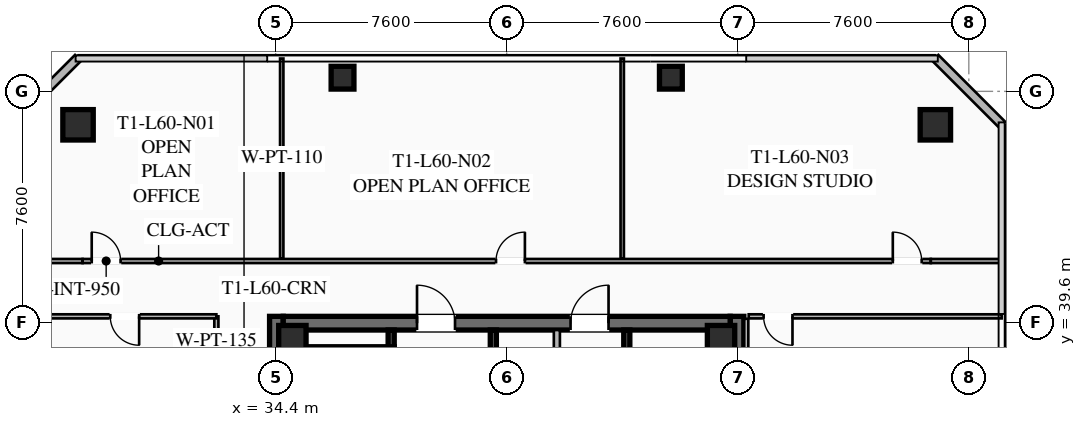
"""IFC4 building model, lengths in metres.
Left out: names, types, materials, properties, quantities, classifications, styles, units other than length and angle.
Written with IfcOpenShell. Run it as: python <this file> out.ifc"""

import sys

from ifc_helpers import new_model, si_unit, direction, frame, frame_2d, origin, origin_2d, place, context, subcontext, project, spatial, rectangle, hollow_rectangle, extrude, element, fill, save


model = new_model("IFC4")
c1 = context("Model", 3, precision=1e-05, world=origin(), true_north=direction((0.0, 1.0)))
c2 = subcontext(c1, "Body", "Model", "MODEL_VIEW")
j1 = project(units=[si_unit("LENGTHUNIT", "METRE"), si_unit("PLANEANGLEUNIT", "RADIAN")], contexts=[c1])
p1 = place(None, origin())
s1 = spatial("IfcSite", under=j1, at=p1, CompositionType="ELEMENT")
p2 = place(p1, origin())
s2 = spatial("IfcBuilding", under=s1, at=p2, CompositionType="ELEMENT")
p3 = place(p2, frame((0.0, 0.0, 221.95)))
s3 = spatial("IfcBuildingStorey", under=s2, at=p3, CompositionType="ELEMENT", Elevation=221.95)
for number, where, z_axis, x_axis in (
    (1, (34.425, 24.2, 0.0), (0.0, 0.0, 1.0), (0.0, 1.0, 0.0)),
    (2, (49.575, 39.8, 0.0), (0.0, 0.0, 1.0), (0.0, -1.0, 0.0)),
):
    element("IfcWall", number, at=place(p3, frame(where, z_axis=z_axis, x_axis=x_axis)), inside=s3, PredefinedType="SHEAR", context=c2, shape_type="SweptSolid", body=[
        extrude(rectangle(XDim=15.6, YDim=0.45, at=frame_2d((7.8, 0.0))), origin(), (0.0, 0.0, 1.0), 3.55),
    ])
p4 = place(p3, frame((34.65, 39.575, 0.0), z_axis=(0.0, 0.0, 1.0), x_axis=(1.0, 0.0, 0.0)))
e3 = element("IfcWall", 3, at=p4, inside=s3, PredefinedType="SHEAR", context=c2, shape_type="SweptSolid", body=[
    extrude(rectangle(XDim=14.7, YDim=0.45, at=frame_2d((7.35, 0.0))), origin(), (0.0, 0.0, 1.0), 3.55),
])
p5 = place(p4, frame((4.4, 0.0, 0.0)))
e4 = element("IfcOpeningElement", 4, at=p5, cuts=e3, PredefinedType="OPENING", context=c2, shape_type="SweptSolid", body=[
    extrude(rectangle(XDim=1.25, YDim=2.25, at=frame_2d((0.625, 1.125))), frame((0.0, 0.235, 0.0), z_axis=(0.0, -1.0, 0.0), x_axis=(1.0, 0.0, 0.0)), (0.0, 0.0, 1.0), 0.47),
])
p6 = place(p4, frame((9.45, 0.0, 0.0)))
e5 = element("IfcOpeningElement", 5, at=p6, cuts=e3, PredefinedType="OPENING", context=c2, shape_type="SweptSolid", body=[
    extrude(rectangle(XDim=1.25, YDim=2.25, at=frame_2d((0.625, 1.125))), frame((0.0, 0.235, 0.0), z_axis=(0.0, -1.0, 0.0), x_axis=(1.0, 0.0, 0.0)), (0.0, 0.0, 1.0), 0.47),
])
for number, where, z_axis, x_axis in (
    (6, (49.05, 39.05, 0.0), (0.0, 0.0, 1.0), (1.0, 0.0, 0.0)),
    (7, (34.95, 39.05, 0.0), (0.0, 0.0, 1.0), (1.0, 0.0, 0.0)),
):
    element("IfcColumn", number, at=place(p3, frame(where, z_axis=z_axis, x_axis=x_axis)), inside=s3, PredefinedType="COLUMN", context=c2, shape_type="SweptSolid", body=[
        extrude(hollow_rectangle(XDim=0.9, YDim=0.9, WallThickness=0.04, at=origin_2d()), origin(), (0.0, 0.0, 1.0), 3.37),
    ])
for number, where, z_axis, x_axis in (
    (8, (56.1, 46.1, 0.0), (0.0, 0.0, 1.0), (1.0, 0.0, 0.0)),
    (9, (27.9, 46.1, 0.0), (0.0, 0.0, 1.0), (1.0, 0.0, 0.0)),
):
    element("IfcColumn", number, at=place(p3, frame(where, z_axis=z_axis, x_axis=x_axis)), inside=s3, PredefinedType="COLUMN", context=c2, shape_type="SweptSolid", body=[
        extrude(hollow_rectangle(XDim=1.0, YDim=1.0, WallThickness=0.04, at=origin_2d()), origin(), (0.0, 0.0, 1.0), 3.37),
    ])
for number, where, z_axis, x_axis in (
    (10, (47.4, 47.65, 0.0), (0.0, 0.0, 1.0), (1.0, 0.0, 0.0)),
    (11, (36.6, 47.65, 0.0), (0.0, 0.0, 1.0), (1.0, 0.0, 0.0)),
):
    element("IfcColumn", number, at=place(p3, frame(where, z_axis=z_axis, x_axis=x_axis)), inside=s3, PredefinedType="COLUMN", context=c2, shape_type="SweptSolid", body=[
        extrude(hollow_rectangle(XDim=0.75, YDim=0.75, WallThickness=0.032, at=origin_2d()), origin(), (0.0, 0.0, 1.0), 3.37),
    ])
for number, where, z_axis, x_axis in (
    (12, (25.7, 46.1, 0.0), (0.0, 0.0, 1.0), (0.707, 0.707, 0.0)),
    (13, (56.1, 48.3, 0.0), (0.0, 0.0, 1.0), (0.707, -0.707, 0.0)),
):
    element("IfcWall", number, at=place(p3, frame(where, z_axis=z_axis, x_axis=x_axis)), inside=s3, PredefinedType="SOLIDWALL", context=c2, shape_type="SweptSolid", body=[
        extrude(rectangle(XDim=3.111, YDim=0.28, at=frame_2d((1.556, 0.0))), origin(), (0.0, 0.0, 1.0), 3.37),
    ])
p7 = place(p3, frame((38.2, 31.2, 0.0), z_axis=(0.0, 0.0, 1.0), x_axis=(0.0, 1.0, 0.0)))
e14 = element("IfcWall", 14, at=p7, inside=s3, PredefinedType="SHEAR", context=c2, shape_type="SweptSolid", body=[
    extrude(rectangle(XDim=8.15, YDim=0.2, at=frame_2d((4.075, 0.0))), origin(), (0.0, 0.0, 1.0), 3.37),
])
p8 = place(p7, frame((0.45, 0.0, 0.0)))
e15 = element("IfcOpeningElement", 15, at=p8, cuts=e14, PredefinedType="OPENING", context=c2, shape_type="SweptSolid", body=[
    extrude(rectangle(XDim=1.15, YDim=2.2, at=frame_2d((0.575, 1.1))), frame((0.0, 0.11, 0.0), z_axis=(0.0, -1.0, 0.0), x_axis=(1.0, 0.0, 0.0)), (0.0, 0.0, 1.0), 0.22),
])
p9 = place(p3, frame((41.56, 24.65, 0.0), z_axis=(0.0, 0.0, 1.0), x_axis=(0.0, 1.0, 0.0)))
e16 = element("IfcWall", 16, at=p9, inside=s3, PredefinedType="SHEAR", context=c2, shape_type="SweptSolid", body=[
    extrude(rectangle(XDim=14.7, YDim=0.2, at=frame_2d((7.35, 0.0))), origin(), (0.0, 0.0, 1.0), 3.37),
])
p10 = place(p3, frame((45.95, 39.35, 0.0), z_axis=(0.0, 0.0, 1.0), x_axis=(0.0, -1.0, 0.0)))
e17 = element("IfcWall", 17, at=p10, inside=s3, PredefinedType="SHEAR", context=c2, shape_type="SweptSolid", body=[
    extrude(rectangle(XDim=6.55, YDim=0.2, at=frame_2d((3.275, 0.0))), origin(), (0.0, 0.0, 1.0), 3.37),
])
p11 = place(p10, frame((5.075, 0.0, 0.0)))
e18 = element("IfcOpeningElement", 18, at=p11, cuts=e17, PredefinedType="OPENING", context=c2, shape_type="SweptSolid", body=[
    extrude(rectangle(XDim=1.1, YDim=2.2, at=frame_2d((0.55, 1.1))), frame((0.0, 0.11, 0.0), z_axis=(0.0, -1.0, 0.0), x_axis=(1.0, 0.0, 0.0)), (0.0, 0.0, 1.0), 0.22),
])
p12 = place(p10, frame((3.025, 0.0, 0.0)))
e19 = element("IfcOpeningElement", 19, at=p12, cuts=e17, PredefinedType="OPENING", context=c2, shape_type="SweptSolid", body=[
    extrude(rectangle(XDim=1.1, YDim=2.2, at=frame_2d((0.55, 1.1))), frame((0.0, 0.11, 0.0), z_axis=(0.0, -1.0, 0.0), x_axis=(1.0, 0.0, 0.0)), (0.0, 0.0, 1.0), 0.22),
])
p13 = place(p10, frame((1.025, 0.0, 0.0)))
e20 = element("IfcOpeningElement", 20, at=p13, cuts=e17, PredefinedType="OPENING", context=c2, shape_type="SweptSolid", body=[
    extrude(rectangle(XDim=1.1, YDim=2.2, at=frame_2d((0.55, 1.1))), frame((0.0, 0.11, 0.0), z_axis=(0.0, -1.0, 0.0), x_axis=(1.0, 0.0, 0.0)), (0.0, 0.0, 1.0), 0.22),
])
p14 = place(p3, frame((43.65, 32.35, 0.0), z_axis=(0.0, 0.0, 1.0), x_axis=(0.0, 1.0, 0.0)))
e21 = element("IfcWall", 21, at=p14, inside=s3, PredefinedType="SOLIDWALL", context=c2, shape_type="SweptSolid", body=[
    extrude(rectangle(XDim=7.0, YDim=0.2, at=frame_2d((3.5, 0.0))), origin(), (0.0, 0.0, 1.0), 2.723),
])
p15 = place(p14, frame((0.85, 0.0, 0.0)))
e22 = element("IfcOpeningElement", 22, at=p15, cuts=e21, PredefinedType="OPENING", context=c2, shape_type="SweptSolid", body=[
    extrude(rectangle(XDim=0.95, YDim=2.05, at=frame_2d((0.475, 1.025))), frame((0.0, 0.11, 0.0), z_axis=(0.0, -1.0, 0.0), x_axis=(1.0, 0.0, 0.0)), (0.0, 0.0, 1.0), 0.22),
])
p16 = place(p14, frame((4.85, 0.0, 0.0)))
e23 = element("IfcOpeningElement", 23, at=p16, cuts=e21, PredefinedType="OPENING", context=c2, shape_type="SweptSolid", body=[
    extrude(rectangle(XDim=0.95, YDim=2.05, at=frame_2d((0.475, 1.025))), frame((0.0, 0.11, 0.0), z_axis=(0.0, -1.0, 0.0), x_axis=(1.0, 0.0, 0.0)), (0.0, 0.0, 1.0), 0.22),
])
p17 = place(p3, frame((32.45, 35.4, 0.0), z_axis=(0.0, 0.0, 1.0), x_axis=(0.0, 1.0, 0.0)))
e24 = element("IfcWall", 24, at=p17, inside=s3, PredefinedType="PARTITIONING", context=c2, shape_type="SweptSolid", body=[
    extrude(rectangle(XDim=4.4, YDim=0.135, at=frame_2d((2.2, 0.0))), origin(), (0.0, 0.0, 1.0), 2.723),
])
p18 = place(p3, frame((28.05, 41.62, 0.0), z_axis=(0.0, 0.0, 1.0), x_axis=(1.0, 0.0, 0.0)))
e25 = element("IfcWall", 25, at=p18, inside=s3, PredefinedType="PARTITIONING", context=c2, shape_type="SweptSolid", body=[
    extrude(rectangle(XDim=27.9, YDim=0.135, at=frame_2d((13.95, 0.0))), origin(), (0.0, 0.0, 1.0), 2.723),
])
p19 = place(p18, frame((0.3, 0.0, 0.0)))
e26 = element("IfcOpeningElement", 26, at=p19, cuts=e25, PredefinedType="OPENING", context=c2, shape_type="SweptSolid", body=[
    extrude(rectangle(XDim=0.95, YDim=2.05, at=frame_2d((0.475, 1.025))), frame((0.0, 0.077, 0.0), z_axis=(0.0, -1.0, 0.0), x_axis=(1.0, 0.0, 0.0)), (0.0, 0.0, 1.0), 0.155),
])
p20 = place(p18, frame((13.599, 0.0, 0.0)))
e27 = element("IfcOpeningElement", 27, at=p20, cuts=e25, PredefinedType="OPENING", context=c2, shape_type="SweptSolid", body=[
    extrude(rectangle(XDim=0.95, YDim=2.05, at=frame_2d((0.475, 1.025))), frame((0.0, 0.077, 0.0), z_axis=(0.0, -1.0, 0.0), x_axis=(1.0, 0.0, 0.0)), (0.0, 0.0, 1.0), 0.155),
])
p21 = place(p18, frame((26.65, 0.0, 0.0)))
e28 = element("IfcOpeningElement", 28, at=p21, cuts=e25, PredefinedType="OPENING", context=c2, shape_type="SweptSolid", body=[
    extrude(rectangle(XDim=0.95, YDim=2.05, at=frame_2d((0.475, 1.025))), frame((0.0, 0.077, 0.0), z_axis=(0.0, -1.0, 0.0), x_axis=(1.0, 0.0, 0.0)), (0.0, 0.0, 1.0), 0.155),
])
for number, where, z_axis, x_axis in (
    (29, (25.72, 41.62, 0.0), (0.0, 0.0, 1.0), (1.0, 0.0, 0.0)),
    (30, (55.95, 41.62, 0.0), (0.0, 0.0, 1.0), (1.0, 0.0, 0.0)),
):
    element("IfcWall", number, at=place(p3, frame(where, z_axis=z_axis, x_axis=x_axis)), inside=s3, PredefinedType="PARTITIONING", context=c2, shape_type="SweptSolid", body=[
        extrude(rectangle(XDim=2.33, YDim=0.135, at=frame_2d((1.165, 0.0))), origin(), (0.0, 0.0, 1.0), 2.723),
    ])
for number, where, z_axis, x_axis in (
    (31, (34.6, 41.7, 0.0), (0.0, 0.0, 1.0), (0.0, 1.0, 0.0)),
    (32, (45.8, 41.7, 0.0), (0.0, 0.0, 1.0), (0.0, 1.0, 0.0)),
):
    element("IfcWall", number, at=place(p3, frame(where, z_axis=z_axis, x_axis=x_axis)), inside=s3, PredefinedType="PARTITIONING", context=c2, shape_type="SweptSolid", body=[
        extrude(rectangle(XDim=6.58, YDim=0.11, at=frame_2d((3.29, 0.0))), origin(), (0.0, 0.0, 1.0), 2.723),
    ])
p22 = place(p3, frame((49.88, 39.72, 0.0), z_axis=(0.0, 0.0, 1.0), x_axis=(0.0, -1.0, 0.0)))
e33 = element("IfcWall", 33, at=p22, inside=s3, PredefinedType="PARTITIONING", context=c2, shape_type="SweptSolid", body=[
    extrude(rectangle(XDim=15.44, YDim=0.135, at=frame_2d((7.72, 0.0))), origin(), (0.0, 0.0, 1.0), 2.723),
])
p23 = place(p3, frame((58.28, 39.8, 0.0), z_axis=(0.0, 0.0, 1.0), x_axis=(-1.0, 0.0, 0.0)))
e34 = element("IfcWall", 34, at=p23, inside=s3, PredefinedType="PARTITIONING", context=c2, shape_type="SweptSolid", body=[
    extrude(rectangle(XDim=8.32, YDim=0.135, at=frame_2d((4.16, 0.0))), origin(), (0.0, 0.0, 1.0), 2.723),
])
p24 = place(p23, frame((6.88, 0.0, 0.0)))
e35 = element("IfcOpeningElement", 35, at=p24, cuts=e34, PredefinedType="OPENING", context=c2, shape_type="SweptSolid", body=[
    extrude(rectangle(XDim=0.95, YDim=2.05, at=frame_2d((0.475, 1.025))), frame((0.0, 0.077, 0.0), z_axis=(0.0, -1.0, 0.0), x_axis=(1.0, 0.0, 0.0)), (0.0, 0.0, 1.0), 0.155),
])
p25 = place(p3, frame((32.45, 39.8, 0.0), z_axis=(0.0, 0.0, 1.0), x_axis=(-1.0, 0.0, 0.0)))
e36 = element("IfcWall", 36, at=p25, inside=s3, PredefinedType="PARTITIONING", context=c2, shape_type="SweptSolid", body=[
    extrude(rectangle(XDim=6.73, YDim=0.135, at=frame_2d((3.365, 0.0))), origin(), (0.0, 0.0, 1.0), 2.723),
])
p26 = place(p25, frame((2.54, 0.0, 0.0)))
e37 = element("IfcOpeningElement", 37, at=p26, cuts=e36, PredefinedType="OPENING", context=c2, shape_type="SweptSolid", body=[
    extrude(rectangle(XDim=0.95, YDim=2.05, at=frame_2d((0.475, 1.025))), frame((0.0, 0.077, 0.0), z_axis=(0.0, -1.0, 0.0), x_axis=(1.0, 0.0, 0.0)), (0.0, 0.0, 1.0), 0.155),
])
p27 = place(p5, origin())
e38 = element("IfcDoor", 38, at=p27, inside=s3, OperationType="SINGLE_SWING_LEFT", PredefinedType="DOOR", context=c2, shape_type="SweptSolid", body=[
    extrude(rectangle(XDim=1.25, YDim=2.25, at=frame_2d((0.625, 1.125))), frame((0.0, 0.025, 0.0), z_axis=(0.0, -1.0, 0.0), x_axis=(1.0, 0.0, 0.0)), (0.0, 0.0, 1.0), 0.05),
])
fill(e4, e38)
p28 = place(p6, origin())
e39 = element("IfcDoor", 39, at=p28, inside=s3, OperationType="SINGLE_SWING_RIGHT", PredefinedType="DOOR", context=c2, shape_type="SweptSolid", body=[
    extrude(rectangle(XDim=1.25, YDim=2.25, at=frame_2d((0.625, 1.125))), frame((0.0, 0.025, 0.0), z_axis=(0.0, -1.0, 0.0), x_axis=(1.0, 0.0, 0.0)), (0.0, 0.0, 1.0), 0.05),
])
fill(e5, e39)
p29 = place(p19, origin())
e40 = element("IfcDoor", 40, at=p29, inside=s3, OperationType="SINGLE_SWING_LEFT", PredefinedType="DOOR", context=c2, shape_type="SweptSolid", body=[
    extrude(rectangle(XDim=0.95, YDim=2.05, at=frame_2d((0.475, 1.025))), frame((0.0, 0.025, 0.0), z_axis=(0.0, -1.0, 0.0), x_axis=(1.0, 0.0, 0.0)), (0.0, 0.0, 1.0), 0.05),
])
fill(e26, e40)
p30 = place(p20, origin())
e41 = element("IfcDoor", 41, at=p30, inside=s3, OperationType="SINGLE_SWING_RIGHT", PredefinedType="DOOR", context=c2, shape_type="SweptSolid", body=[
    extrude(rectangle(XDim=0.95, YDim=2.05, at=frame_2d((0.475, 1.025))), frame((0.0, 0.025, 0.0), z_axis=(0.0, -1.0, 0.0), x_axis=(1.0, 0.0, 0.0)), (0.0, 0.0, 1.0), 0.05),
])
fill(e27, e41)
p31 = place(p21, origin())
e42 = element("IfcDoor", 42, at=p31, inside=s3, OperationType="SINGLE_SWING_LEFT", PredefinedType="DOOR", context=c2, shape_type="SweptSolid", body=[
    extrude(rectangle(XDim=0.95, YDim=2.05, at=frame_2d((0.475, 1.025))), frame((0.0, 0.025, 0.0), z_axis=(0.0, -1.0, 0.0), x_axis=(1.0, 0.0, 0.0)), (0.0, 0.0, 1.0), 0.05),
])
fill(e28, e42)
p32 = place(p24, origin())
e43 = element("IfcDoor", 43, at=p32, inside=s3, OperationType="SINGLE_SWING_LEFT", PredefinedType="DOOR", context=c2, shape_type="SweptSolid", body=[
    extrude(rectangle(XDim=0.95, YDim=2.05, at=frame_2d((0.475, 1.025))), frame((0.0, 0.025, 0.0), z_axis=(0.0, -1.0, 0.0), x_axis=(1.0, 0.0, 0.0)), (0.0, 0.0, 1.0), 0.05),
])
fill(e35, e43)
p33 = place(p26, origin())
e44 = element("IfcDoor", 44, at=p33, inside=s3, OperationType="SINGLE_SWING_LEFT", PredefinedType="DOOR", context=c2, shape_type="SweptSolid", body=[
    extrude(rectangle(XDim=0.95, YDim=2.05, at=frame_2d((0.475, 1.025))), frame((0.0, 0.025, 0.0), z_axis=(0.0, -1.0, 0.0), x_axis=(1.0, 0.0, 0.0)), (0.0, 0.0, 1.0), 0.05),
])
fill(e37, e44)
save(model, sys.argv[1])
